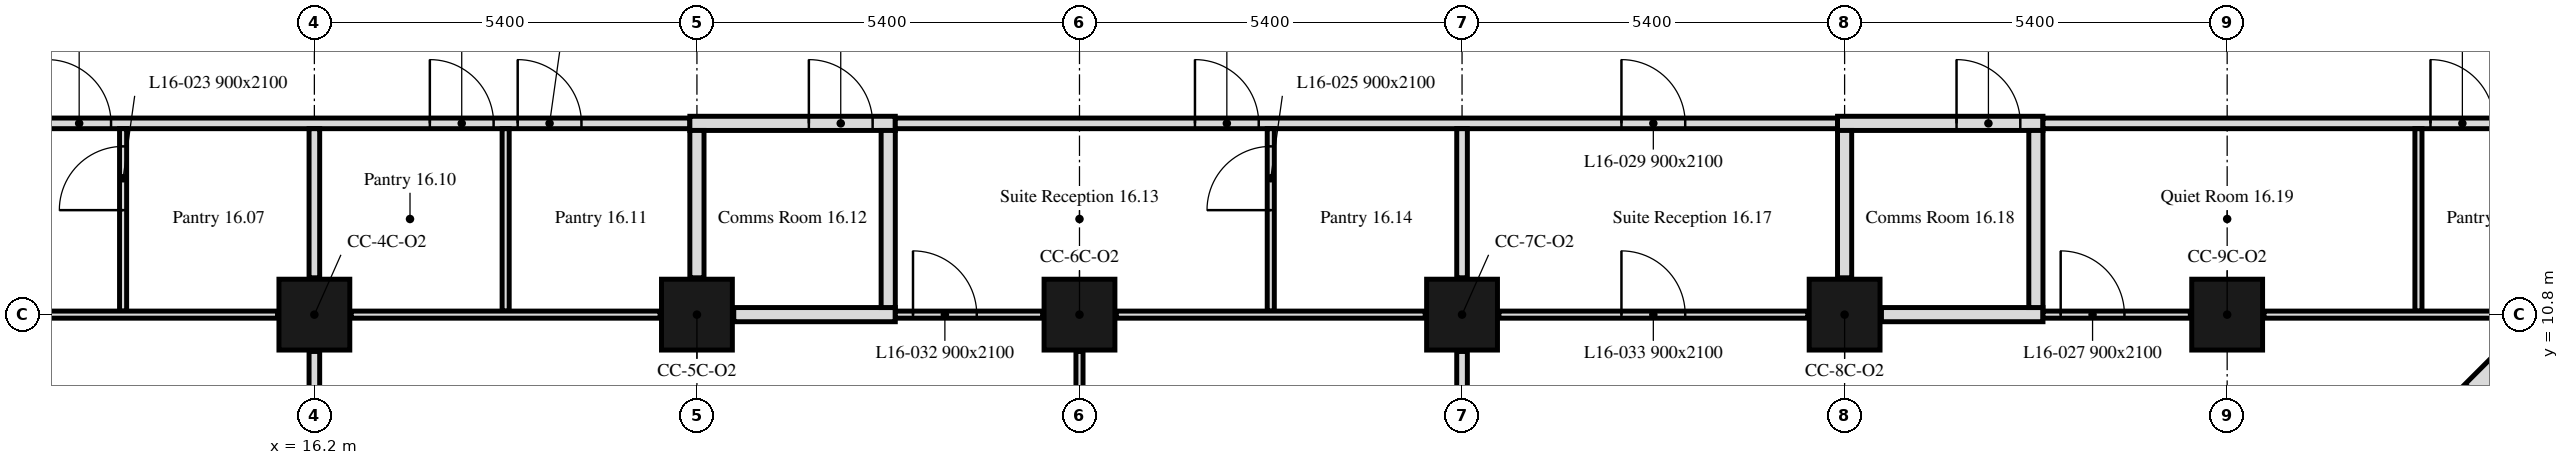
"""IFC4 building model, lengths in metres.
Left out: names, types, materials, properties, quantities, classifications, styles, units other than length and angle.
Written with IfcOpenShell. Run it as: python <this file> out.ifc"""

import sys

from ifc_helpers import new_model, si_unit, direction, frame, frame_2d, origin, origin_2d, place, context, subcontext, project, spatial, rectangle, extrude, element, fill, save


model = new_model("IFC4")
c1 = context("Model", 3, precision=1e-05, world=origin(), true_north=direction((0.0, 1.0)))
c2 = subcontext(c1, "Body", "Model", "MODEL_VIEW")
j1 = project(units=[si_unit("LENGTHUNIT", "METRE"), si_unit("PLANEANGLEUNIT", "RADIAN")], contexts=[c1])
p1 = place(None, origin())
s1 = spatial("IfcSite", under=j1, at=p1, CompositionType="ELEMENT")
p2 = place(p1, origin())
s2 = spatial("IfcBuilding", under=s1, at=p2, CompositionType="ELEMENT")
p3 = place(p2, frame((0.0, 0.0, 72.6)))
s3 = spatial("IfcBuildingStorey", under=s2, at=p3, CompositionType="ELEMENT", Elevation=72.6)
for number, where, z_axis, x_axis in (
    (1, (16.2, 10.8, 0.0), (0.0, 0.0, 1.0), (1.0, 0.0, 0.0)),
    (2, (21.6, 10.8, 0.0), (0.0, 0.0, 1.0), (1.0, 0.0, 0.0)),
    (3, (27.0, 10.8, 0.0), (0.0, 0.0, 1.0), (1.0, 0.0, 0.0)),
    (4, (32.4, 10.8, 0.0), (0.0, 0.0, 1.0), (1.0, 0.0, 0.0)),
    (5, (37.8, 10.8, 0.0), (0.0, 0.0, 1.0), (1.0, 0.0, 0.0)),
    (6, (43.2, 10.8, 0.0), (0.0, 0.0, 1.0), (1.0, 0.0, 0.0)),
):
    element("IfcColumn", number, at=place(p3, frame(where, z_axis=z_axis, x_axis=x_axis)), inside=s3, PredefinedType="COLUMN", context=c2, shape_type="SweptSolid", body=[
        extrude(rectangle(XDim=1.0, YDim=1.0, at=origin_2d()), origin(), (0.0, 0.0, 1.0), 3.5),
    ])
p4 = place(p3, frame((43.051, 6.099, 0.0), z_axis=(0.0, 0.0, 1.0), x_axis=(0.707106781187, 0.707106781187, 0.0)))
e7 = element("IfcWall", 7, at=p4, inside=s3, PredefinedType="SOLIDWALL", context=c2, shape_type="SweptSolid", body=[
    extrude(rectangle(XDim=6.86, YDim=0.3, at=frame_2d((3.43, 0.0))), origin(), (0.0, 0.0, 1.0), 3.5),
])
p5 = place(p4, frame((1.73, 0.0, 0.9)))
e8 = element("IfcOpeningElement", 8, at=p5, cuts=e7, PredefinedType="OPENING", context=c2, shape_type="SweptSolid", body=[
    extrude(rectangle(XDim=3.4, YDim=1.7, at=frame_2d((1.7, 0.85))), frame((0.0, 0.16, 0.0), z_axis=(0.0, -1.0, 0.0), x_axis=(1.0, 0.0, 0.0)), (0.0, 0.0, 1.0), 0.32),
])
p6 = place(p3, frame((6.151, 13.5, 0.0), z_axis=(0.0, 0.0, 1.0), x_axis=(1.0, 0.0, 0.0)))
e9 = element("IfcWall", 9, at=p6, inside=s3, PredefinedType="PARTITIONING", context=c2, shape_type="SweptSolid", body=[
    extrude(rectangle(XDim=15.349, YDim=0.15, at=frame_2d((7.675, 0.0))), origin(), (0.0, 0.0, 1.0), 3.5),
])
p7 = place(p6, frame((0.879, 0.0, 0.0)))
e10 = element("IfcOpeningElement", 10, at=p7, cuts=e9, PredefinedType="OPENING", context=c2, shape_type="SweptSolid", body=[
    extrude(rectangle(XDim=0.9, YDim=2.1, at=frame_2d((0.45, 1.05))), frame((0.0, 0.075, 0.0), z_axis=(0.0, -1.0, 0.0), x_axis=(1.0, 0.0, 0.0)), (0.0, 0.0, 1.0), 0.15),
])
p8 = place(p6, frame((11.679, 0.0, 0.0)))
e11 = element("IfcOpeningElement", 11, at=p8, cuts=e9, PredefinedType="OPENING", context=c2, shape_type="SweptSolid", body=[
    extrude(rectangle(XDim=0.9, YDim=2.1, at=frame_2d((0.45, 1.05))), frame((0.0, 0.075, 0.0), z_axis=(0.0, -1.0, 0.0), x_axis=(1.0, 0.0, 0.0)), (0.0, 0.0, 1.0), 0.15),
])
p9 = place(p6, frame((12.919, 0.0, 0.0)))
e12 = element("IfcOpeningElement", 12, at=p9, cuts=e9, PredefinedType="OPENING", context=c2, shape_type="SweptSolid", body=[
    extrude(rectangle(XDim=0.9, YDim=2.1, at=frame_2d((0.45, 1.05))), frame((0.0, 0.075, 0.0), z_axis=(0.0, -1.0, 0.0), x_axis=(1.0, 0.0, 0.0)), (0.0, 0.0, 1.0), 0.15),
])
p10 = place(p6, frame((6.279, 0.0, 0.0)))
e13 = element("IfcOpeningElement", 13, at=p10, cuts=e9, PredefinedType="OPENING", context=c2, shape_type="SweptSolid", body=[
    extrude(rectangle(XDim=0.9, YDim=2.1, at=frame_2d((0.45, 1.05))), frame((0.0, 0.075, 0.0), z_axis=(0.0, -1.0, 0.0), x_axis=(1.0, 0.0, 0.0)), (0.0, 0.0, 1.0), 0.15),
])
p11 = place(p3, frame((21.5, 13.5, 0.0), z_axis=(0.0, 0.0, 1.0), x_axis=(1.0, 0.0, 0.0)))
e14 = element("IfcWall", 14, at=p11, inside=s3, PredefinedType="PARTITIONING", context=c2, shape_type="SweptSolid", body=[
    extrude(rectangle(XDim=2.9, YDim=0.2, at=frame_2d((1.45, 0.0))), origin(), (0.0, 0.0, 1.0), 3.5),
])
p12 = place(p11, frame((1.68, 0.0, 0.0)))
e15 = element("IfcOpeningElement", 15, at=p12, cuts=e14, PredefinedType="OPENING", context=c2, shape_type="SweptSolid", body=[
    extrude(rectangle(XDim=0.9, YDim=2.1, at=frame_2d((0.45, 1.05))), frame((0.0, 0.1, 0.0), z_axis=(0.0, -1.0, 0.0), x_axis=(1.0, 0.0, 0.0)), (0.0, 0.0, 1.0), 0.2),
])
p13 = place(p3, frame((24.4, 13.5, 0.0), z_axis=(0.0, 0.0, 1.0), x_axis=(1.0, 0.0, 0.0)))
e16 = element("IfcWall", 16, at=p13, inside=s3, PredefinedType="PARTITIONING", context=c2, shape_type="SweptSolid", body=[
    extrude(rectangle(XDim=13.3, YDim=0.15, at=frame_2d((6.65, 0.0))), origin(), (0.0, 0.0, 1.0), 3.5),
])
p14 = place(p13, frame((10.25, 0.0, 0.0)))
e17 = element("IfcOpeningElement", 17, at=p14, cuts=e16, PredefinedType="OPENING", context=c2, shape_type="SweptSolid", body=[
    extrude(rectangle(XDim=0.9, YDim=2.1, at=frame_2d((0.45, 1.05))), frame((0.0, 0.075, 0.0), z_axis=(0.0, -1.0, 0.0), x_axis=(1.0, 0.0, 0.0)), (0.0, 0.0, 1.0), 0.15),
])
p15 = place(p13, frame((4.23, 0.0, 0.0)))
e18 = element("IfcOpeningElement", 18, at=p15, cuts=e16, PredefinedType="OPENING", context=c2, shape_type="SweptSolid", body=[
    extrude(rectangle(XDim=0.9, YDim=2.1, at=frame_2d((0.45, 1.05))), frame((0.0, 0.075, 0.0), z_axis=(0.0, -1.0, 0.0), x_axis=(1.0, 0.0, 0.0)), (0.0, 0.0, 1.0), 0.15),
])
p16 = place(p3, frame((37.7, 13.5, 0.0), z_axis=(0.0, 0.0, 1.0), x_axis=(1.0, 0.0, 0.0)))
e19 = element("IfcWall", 19, at=p16, inside=s3, PredefinedType="PARTITIONING", context=c2, shape_type="SweptSolid", body=[
    extrude(rectangle(XDim=2.9, YDim=0.2, at=frame_2d((1.45, 0.0))), origin(), (0.0, 0.0, 1.0), 3.5),
])
p17 = place(p16, frame((1.68, 0.0, 0.0)))
e20 = element("IfcOpeningElement", 20, at=p17, cuts=e19, PredefinedType="OPENING", context=c2, shape_type="SweptSolid", body=[
    extrude(rectangle(XDim=0.9, YDim=2.1, at=frame_2d((0.45, 1.05))), frame((0.0, 0.1, 0.0), z_axis=(0.0, -1.0, 0.0), x_axis=(1.0, 0.0, 0.0)), (0.0, 0.0, 1.0), 0.2),
])
p18 = place(p3, frame((40.6, 13.5, 0.0), z_axis=(0.0, 0.0, 1.0), x_axis=(1.0, 0.0, 0.0)))
e21 = element("IfcWall", 21, at=p18, inside=s3, PredefinedType="PARTITIONING", context=c2, shape_type="SweptSolid", body=[
    extrude(rectangle(XDim=7.249, YDim=0.15, at=frame_2d((3.625, 0.0))), origin(), (0.0, 0.0, 1.0), 3.5),
])
p19 = place(p18, frame((5.47, 0.0, 0.0)))
e22 = element("IfcOpeningElement", 22, at=p19, cuts=e21, PredefinedType="OPENING", context=c2, shape_type="SweptSolid", body=[
    extrude(rectangle(XDim=0.9, YDim=2.1, at=frame_2d((0.45, 1.05))), frame((0.0, 0.075, 0.0), z_axis=(0.0, -1.0, 0.0), x_axis=(1.0, 0.0, 0.0)), (0.0, 0.0, 1.0), 0.15),
])
p20 = place(p3, frame((13.5, 10.85, 0.0), z_axis=(0.0, 0.0, 1.0), x_axis=(0.0, 1.0, 0.0)))
e23 = element("IfcWall", 23, at=p20, inside=s3, PredefinedType="PARTITIONING", context=c2, shape_type="SweptSolid", body=[
    extrude(rectangle(XDim=2.575, YDim=0.1, at=frame_2d((1.288, 0.0))), origin(), (0.0, 0.0, 1.0), 3.5),
])
p21 = place(p20, frame((1.425, 0.0, 0.0)))
e24 = element("IfcOpeningElement", 24, at=p21, cuts=e23, PredefinedType="OPENING", context=c2, shape_type="SweptSolid", body=[
    extrude(rectangle(XDim=0.9, YDim=2.1, at=frame_2d((0.45, 1.05))), frame((0.0, 0.05, 0.0), z_axis=(0.0, -1.0, 0.0), x_axis=(1.0, 0.0, 0.0)), (0.0, 0.0, 1.0), 0.1),
])
p22 = place(p3, frame((11.32, 10.8, 0.0), z_axis=(0.0, 0.0, 1.0), x_axis=(1.0, 0.0, 0.0)))
e25 = element("IfcWall", 25, at=p22, inside=s3, PredefinedType="PARTITIONING", context=c2, shape_type="SweptSolid", body=[
    extrude(rectangle(XDim=4.36, YDim=0.1, at=frame_2d((2.18, 0.0))), origin(), (0.0, 0.0, 1.0), 3.5),
])
p23 = place(p3, frame((16.2, 11.32, 0.0), z_axis=(0.0, 0.0, 1.0), x_axis=(0.0, 1.0, 0.0)))
e26 = element("IfcWall", 26, at=p23, inside=s3, PredefinedType="PARTITIONING", context=c2, shape_type="SweptSolid", body=[
    extrude(rectangle(XDim=2.105, YDim=0.15, at=frame_2d((1.052, 0.0))), origin(), (0.0, 0.0, 1.0), 3.5),
])
p24 = place(p3, frame((16.2, 6.151, 0.0), z_axis=(0.0, 0.0, 1.0), x_axis=(0.0, 1.0, 0.0)))
e27 = element("IfcWall", 27, at=p24, inside=s3, PredefinedType="PARTITIONING", context=c2, shape_type="SweptSolid", body=[
    extrude(rectangle(XDim=4.129, YDim=0.15, at=frame_2d((2.064, 0.0))), origin(), (0.0, 0.0, 1.0), 3.5),
])
p25 = place(p3, frame((18.9, 10.85, 0.0), z_axis=(0.0, 0.0, 1.0), x_axis=(0.0, 1.0, 0.0)))
e28 = element("IfcWall", 28, at=p25, inside=s3, PredefinedType="PARTITIONING", context=c2, shape_type="SweptSolid", body=[
    extrude(rectangle(XDim=2.575, YDim=0.1, at=frame_2d((1.288, 0.0))), origin(), (0.0, 0.0, 1.0), 3.5),
])
p26 = place(p3, frame((16.72, 10.8, 0.0), z_axis=(0.0, 0.0, 1.0), x_axis=(1.0, 0.0, 0.0)))
e29 = element("IfcWall", 29, at=p26, inside=s3, PredefinedType="PARTITIONING", context=c2, shape_type="SweptSolid", body=[
    extrude(rectangle(XDim=4.36, YDim=0.1, at=frame_2d((2.18, 0.0))), origin(), (0.0, 0.0, 1.0), 3.5),
])
p27 = place(p3, frame((21.6, 11.32, 0.0), z_axis=(0.0, 0.0, 1.0), x_axis=(0.0, 1.0, 0.0)))
e30 = element("IfcWall", 30, at=p27, inside=s3, PredefinedType="PARTITIONING", context=c2, shape_type="SweptSolid", body=[
    extrude(rectangle(XDim=2.08, YDim=0.2, at=frame_2d((1.04, 0.0))), origin(), (0.0, 0.0, 1.0), 3.5),
])
p28 = place(p3, frame((22.12, 10.8, 0.0), z_axis=(0.0, 0.0, 1.0), x_axis=(1.0, 0.0, 0.0)))
e31 = element("IfcWall", 31, at=p28, inside=s3, PredefinedType="PARTITIONING", context=c2, shape_type="SweptSolid", body=[
    extrude(rectangle(XDim=2.28, YDim=0.2, at=frame_2d((1.14, 0.0))), origin(), (0.0, 0.0, 1.0), 3.5),
])
p29 = place(p3, frame((24.3, 10.9, 0.0), z_axis=(0.0, 0.0, 1.0), x_axis=(0.0, 1.0, 0.0)))
e32 = element("IfcWall", 32, at=p29, inside=s3, PredefinedType="PARTITIONING", context=c2, shape_type="SweptSolid", body=[
    extrude(rectangle(XDim=2.5, YDim=0.2, at=frame_2d((1.25, 0.0))), origin(), (0.0, 0.0, 1.0), 3.5),
])
p30 = place(p3, frame((24.4, 10.8, 0.0), z_axis=(0.0, 0.0, 1.0), x_axis=(1.0, 0.0, 0.0)))
e33 = element("IfcWall", 33, at=p30, inside=s3, PredefinedType="PARTITIONING", context=c2, shape_type="SweptSolid", body=[
    extrude(rectangle(XDim=2.08, YDim=0.1, at=frame_2d((1.04, 0.0))), origin(), (0.0, 0.0, 1.0), 3.5),
])
p31 = place(p30, frame((0.25, 0.0, 0.0)))
e34 = element("IfcOpeningElement", 34, at=p31, cuts=e33, PredefinedType="OPENING", context=c2, shape_type="SweptSolid", body=[
    extrude(rectangle(XDim=0.9, YDim=2.1, at=frame_2d((0.45, 1.05))), frame((0.0, 0.05, 0.0), z_axis=(0.0, -1.0, 0.0), x_axis=(1.0, 0.0, 0.0)), (0.0, 0.0, 1.0), 0.1),
])
p32 = place(p3, frame((29.7, 10.85, 0.0), z_axis=(0.0, 0.0, 1.0), x_axis=(0.0, 1.0, 0.0)))
e35 = element("IfcWall", 35, at=p32, inside=s3, PredefinedType="PARTITIONING", context=c2, shape_type="SweptSolid", body=[
    extrude(rectangle(XDim=2.575, YDim=0.1, at=frame_2d((1.288, 0.0))), origin(), (0.0, 0.0, 1.0), 3.5),
])
p33 = place(p32, frame((1.425, 0.0, 0.0)))
e36 = element("IfcOpeningElement", 36, at=p33, cuts=e35, PredefinedType="OPENING", context=c2, shape_type="SweptSolid", body=[
    extrude(rectangle(XDim=0.9, YDim=2.1, at=frame_2d((0.45, 1.05))), frame((0.0, 0.05, 0.0), z_axis=(0.0, -1.0, 0.0), x_axis=(1.0, 0.0, 0.0)), (0.0, 0.0, 1.0), 0.1),
])
p34 = place(p3, frame((27.52, 10.8, 0.0), z_axis=(0.0, 0.0, 1.0), x_axis=(1.0, 0.0, 0.0)))
e37 = element("IfcWall", 37, at=p34, inside=s3, PredefinedType="PARTITIONING", context=c2, shape_type="SweptSolid", body=[
    extrude(rectangle(XDim=4.36, YDim=0.1, at=frame_2d((2.18, 0.0))), origin(), (0.0, 0.0, 1.0), 3.5),
])
p35 = place(p3, frame((32.4, 11.32, 0.0), z_axis=(0.0, 0.0, 1.0), x_axis=(0.0, 1.0, 0.0)))
e38 = element("IfcWall", 38, at=p35, inside=s3, PredefinedType="PARTITIONING", context=c2, shape_type="SweptSolid", body=[
    extrude(rectangle(XDim=2.105, YDim=0.15, at=frame_2d((1.052, 0.0))), origin(), (0.0, 0.0, 1.0), 3.5),
])
p36 = place(p3, frame((27.0, 6.151, 0.0), z_axis=(0.0, 0.0, 1.0), x_axis=(0.0, 1.0, 0.0)))
e39 = element("IfcWall", 39, at=p36, inside=s3, PredefinedType="PARTITIONING", context=c2, shape_type="SweptSolid", body=[
    extrude(rectangle(XDim=4.129, YDim=0.1, at=frame_2d((2.064, 0.0))), origin(), (0.0, 0.0, 1.0), 3.5),
])
p37 = place(p36, frame((1.499, 0.0, 0.0)))
e40 = element("IfcOpeningElement", 40, at=p37, cuts=e39, PredefinedType="OPENING", context=c2, shape_type="SweptSolid", body=[
    extrude(rectangle(XDim=0.9, YDim=2.1, at=frame_2d((0.45, 1.05))), frame((0.0, 0.05, 0.0), z_axis=(0.0, -1.0, 0.0), x_axis=(1.0, 0.0, 0.0)), (0.0, 0.0, 1.0), 0.1),
])
p38 = place(p3, frame((32.4, 6.151, 0.0), z_axis=(0.0, 0.0, 1.0), x_axis=(0.0, 1.0, 0.0)))
e41 = element("IfcWall", 41, at=p38, inside=s3, PredefinedType="PARTITIONING", context=c2, shape_type="SweptSolid", body=[
    extrude(rectangle(XDim=4.129, YDim=0.15, at=frame_2d((2.064, 0.0))), origin(), (0.0, 0.0, 1.0), 3.5),
])
p39 = place(p3, frame((32.92, 10.8, 0.0), z_axis=(0.0, 0.0, 1.0), x_axis=(1.0, 0.0, 0.0)))
e42 = element("IfcWall", 42, at=p39, inside=s3, PredefinedType="PARTITIONING", context=c2, shape_type="SweptSolid", body=[
    extrude(rectangle(XDim=4.36, YDim=0.1, at=frame_2d((2.18, 0.0))), origin(), (0.0, 0.0, 1.0), 3.5),
])
p40 = place(p39, frame((1.73, 0.0, 0.0)))
e43 = element("IfcOpeningElement", 43, at=p40, cuts=e42, PredefinedType="OPENING", context=c2, shape_type="SweptSolid", body=[
    extrude(rectangle(XDim=0.9, YDim=2.1, at=frame_2d((0.45, 1.05))), frame((0.0, 0.05, 0.0), z_axis=(0.0, -1.0, 0.0), x_axis=(1.0, 0.0, 0.0)), (0.0, 0.0, 1.0), 0.1),
])
p41 = place(p3, frame((37.8, 11.32, 0.0), z_axis=(0.0, 0.0, 1.0), x_axis=(0.0, 1.0, 0.0)))
e44 = element("IfcWall", 44, at=p41, inside=s3, PredefinedType="PARTITIONING", context=c2, shape_type="SweptSolid", body=[
    extrude(rectangle(XDim=2.08, YDim=0.2, at=frame_2d((1.04, 0.0))), origin(), (0.0, 0.0, 1.0), 3.5),
])
p42 = place(p3, frame((38.32, 10.8, 0.0), z_axis=(0.0, 0.0, 1.0), x_axis=(1.0, 0.0, 0.0)))
e45 = element("IfcWall", 45, at=p42, inside=s3, PredefinedType="PARTITIONING", context=c2, shape_type="SweptSolid", body=[
    extrude(rectangle(XDim=2.28, YDim=0.2, at=frame_2d((1.14, 0.0))), origin(), (0.0, 0.0, 1.0), 3.5),
])
p43 = place(p3, frame((40.5, 10.9, 0.0), z_axis=(0.0, 0.0, 1.0), x_axis=(0.0, 1.0, 0.0)))
e46 = element("IfcWall", 46, at=p43, inside=s3, PredefinedType="PARTITIONING", context=c2, shape_type="SweptSolid", body=[
    extrude(rectangle(XDim=2.5, YDim=0.2, at=frame_2d((1.25, 0.0))), origin(), (0.0, 0.0, 1.0), 3.5),
])
p44 = place(p3, frame((40.6, 10.8, 0.0), z_axis=(0.0, 0.0, 1.0), x_axis=(1.0, 0.0, 0.0)))
e47 = element("IfcWall", 47, at=p44, inside=s3, PredefinedType="PARTITIONING", context=c2, shape_type="SweptSolid", body=[
    extrude(rectangle(XDim=2.08, YDim=0.1, at=frame_2d((1.04, 0.0))), origin(), (0.0, 0.0, 1.0), 3.5),
])
p45 = place(p44, frame((0.25, 0.0, 0.0)))
e48 = element("IfcOpeningElement", 48, at=p45, cuts=e47, PredefinedType="OPENING", context=c2, shape_type="SweptSolid", body=[
    extrude(rectangle(XDim=0.9, YDim=2.1, at=frame_2d((0.45, 1.05))), frame((0.0, 0.05, 0.0), z_axis=(0.0, -1.0, 0.0), x_axis=(1.0, 0.0, 0.0)), (0.0, 0.0, 1.0), 0.1),
])
p46 = place(p3, frame((45.9, 10.85, 0.0), z_axis=(0.0, 0.0, 1.0), x_axis=(0.0, 1.0, 0.0)))
e49 = element("IfcWall", 49, at=p46, inside=s3, PredefinedType="PARTITIONING", context=c2, shape_type="SweptSolid", body=[
    extrude(rectangle(XDim=2.575, YDim=0.1, at=frame_2d((1.288, 0.0))), origin(), (0.0, 0.0, 1.0), 3.5),
])
p47 = place(p3, frame((43.72, 10.8, 0.0), z_axis=(0.0, 0.0, 1.0), x_axis=(1.0, 0.0, 0.0)))
e50 = element("IfcWall", 50, at=p47, inside=s3, PredefinedType="PARTITIONING", context=c2, shape_type="SweptSolid", body=[
    extrude(rectangle(XDim=3.768, YDim=0.1, at=frame_2d((1.884, 0.0))), origin(), (0.0, 0.0, 1.0), 3.5),
])
p48 = place(p8, origin())
e51 = element("IfcDoor", 51, at=p48, inside=s3, OperationType="SINGLE_SWING_LEFT", PredefinedType="DOOR", context=c2, shape_type="SweptSolid", body=[
    extrude(rectangle(XDim=0.9, YDim=2.1, at=frame_2d((0.45, 1.05))), frame((0.0, 0.025, 0.0), z_axis=(0.0, -1.0, 0.0), x_axis=(1.0, 0.0, 0.0)), (0.0, 0.0, 1.0), 0.05),
])
fill(e11, e51)
p49 = place(p9, origin())
e52 = element("IfcDoor", 52, at=p49, inside=s3, OperationType="SINGLE_SWING_LEFT", PredefinedType="DOOR", context=c2, shape_type="SweptSolid", body=[
    extrude(rectangle(XDim=0.9, YDim=2.1, at=frame_2d((0.45, 1.05))), frame((0.0, 0.025, 0.0), z_axis=(0.0, -1.0, 0.0), x_axis=(1.0, 0.0, 0.0)), (0.0, 0.0, 1.0), 0.05),
])
fill(e12, e52)
p50 = place(p12, origin())
e53 = element("IfcDoor", 53, at=p50, inside=s3, OperationType="SINGLE_SWING_LEFT", PredefinedType="DOOR", context=c2, shape_type="SweptSolid", body=[
    extrude(rectangle(XDim=0.9, YDim=2.1, at=frame_2d((0.45, 1.05))), frame((0.0, 0.025, 0.0), z_axis=(0.0, -1.0, 0.0), x_axis=(1.0, 0.0, 0.0)), (0.0, 0.0, 1.0), 0.05),
])
fill(e15, e53)
p51 = place(p17, origin())
e54 = element("IfcDoor", 54, at=p51, inside=s3, OperationType="SINGLE_SWING_LEFT", PredefinedType="DOOR", context=c2, shape_type="SweptSolid", body=[
    extrude(rectangle(XDim=0.9, YDim=2.1, at=frame_2d((0.45, 1.05))), frame((0.0, 0.025, 0.0), z_axis=(0.0, -1.0, 0.0), x_axis=(1.0, 0.0, 0.0)), (0.0, 0.0, 1.0), 0.05),
])
fill(e20, e54)
p52 = place(p19, origin())
e55 = element("IfcDoor", 55, at=p52, inside=s3, OperationType="SINGLE_SWING_LEFT", PredefinedType="DOOR", context=c2, shape_type="SweptSolid", body=[
    extrude(rectangle(XDim=0.9, YDim=2.1, at=frame_2d((0.45, 1.05))), frame((0.0, 0.025, 0.0), z_axis=(0.0, -1.0, 0.0), x_axis=(1.0, 0.0, 0.0)), (0.0, 0.0, 1.0), 0.05),
])
fill(e22, e55)
p53 = place(p21, origin())
e56 = element("IfcDoor", 56, at=p53, inside=s3, OperationType="SINGLE_SWING_LEFT", PredefinedType="DOOR", context=c2, shape_type="SweptSolid", body=[
    extrude(rectangle(XDim=0.9, YDim=2.1, at=frame_2d((0.45, 1.05))), frame((0.0, 0.025, 0.0), z_axis=(0.0, -1.0, 0.0), x_axis=(1.0, 0.0, 0.0)), (0.0, 0.0, 1.0), 0.05),
])
fill(e24, e56)
p54 = place(p33, origin())
e57 = element("IfcDoor", 57, at=p54, inside=s3, OperationType="SINGLE_SWING_LEFT", PredefinedType="DOOR", context=c2, shape_type="SweptSolid", body=[
    extrude(rectangle(XDim=0.9, YDim=2.1, at=frame_2d((0.45, 1.05))), frame((0.0, 0.025, 0.0), z_axis=(0.0, -1.0, 0.0), x_axis=(1.0, 0.0, 0.0)), (0.0, 0.0, 1.0), 0.05),
])
fill(e36, e57)
p55 = place(p45, origin())
e58 = element("IfcDoor", 58, at=p55, inside=s3, OperationType="SINGLE_SWING_LEFT", PredefinedType="DOOR", context=c2, shape_type="SweptSolid", body=[
    extrude(rectangle(XDim=0.9, YDim=2.1, at=frame_2d((0.45, 1.05))), frame((0.0, 0.025, 0.0), z_axis=(0.0, -1.0, 0.0), x_axis=(1.0, 0.0, 0.0)), (0.0, 0.0, 1.0), 0.05),
])
fill(e48, e58)
p56 = place(p14, origin())
e59 = element("IfcDoor", 59, at=p56, inside=s3, OperationType="SINGLE_SWING_LEFT", PredefinedType="DOOR", context=c2, shape_type="SweptSolid", body=[
    extrude(rectangle(XDim=0.9, YDim=2.1, at=frame_2d((0.45, 1.05))), frame((0.0, 0.025, 0.0), z_axis=(0.0, -1.0, 0.0), x_axis=(1.0, 0.0, 0.0)), (0.0, 0.0, 1.0), 0.05),
])
fill(e17, e59)
p57 = place(p31, origin())
e60 = element("IfcDoor", 60, at=p57, inside=s3, OperationType="SINGLE_SWING_LEFT", PredefinedType="DOOR", context=c2, shape_type="SweptSolid", body=[
    extrude(rectangle(XDim=0.9, YDim=2.1, at=frame_2d((0.45, 1.05))), frame((0.0, 0.025, 0.0), z_axis=(0.0, -1.0, 0.0), x_axis=(1.0, 0.0, 0.0)), (0.0, 0.0, 1.0), 0.05),
])
fill(e34, e60)
p58 = place(p40, origin())
e61 = element("IfcDoor", 61, at=p58, inside=s3, OperationType="SINGLE_SWING_RIGHT", PredefinedType="DOOR", context=c2, shape_type="SweptSolid", body=[
    extrude(rectangle(XDim=0.9, YDim=2.1, at=frame_2d((0.45, 1.05))), frame((0.0, 0.025, 0.0), z_axis=(0.0, -1.0, 0.0), x_axis=(1.0, 0.0, 0.0)), (0.0, 0.0, 1.0), 0.05),
])
fill(e43, e61)
p59 = place(p10, origin())
e62 = element("IfcDoor", 62, at=p59, inside=s3, OperationType="SINGLE_SWING_LEFT", PredefinedType="DOOR", context=c2, shape_type="SweptSolid", body=[
    extrude(rectangle(XDim=0.9, YDim=2.1, at=frame_2d((0.45, 1.05))), frame((0.0, 0.025, 0.0), z_axis=(0.0, -1.0, 0.0), x_axis=(1.0, 0.0, 0.0)), (0.0, 0.0, 1.0), 0.05),
])
fill(e13, e62)
p60 = place(p15, origin())
e63 = element("IfcDoor", 63, at=p60, inside=s3, OperationType="SINGLE_SWING_LEFT", PredefinedType="DOOR", context=c2, shape_type="SweptSolid", body=[
    extrude(rectangle(XDim=0.9, YDim=2.1, at=frame_2d((0.45, 1.05))), frame((0.0, 0.025, 0.0), z_axis=(0.0, -1.0, 0.0), x_axis=(1.0, 0.0, 0.0)), (0.0, 0.0, 1.0), 0.05),
])
fill(e18, e63)
save(model, sys.argv[1])
